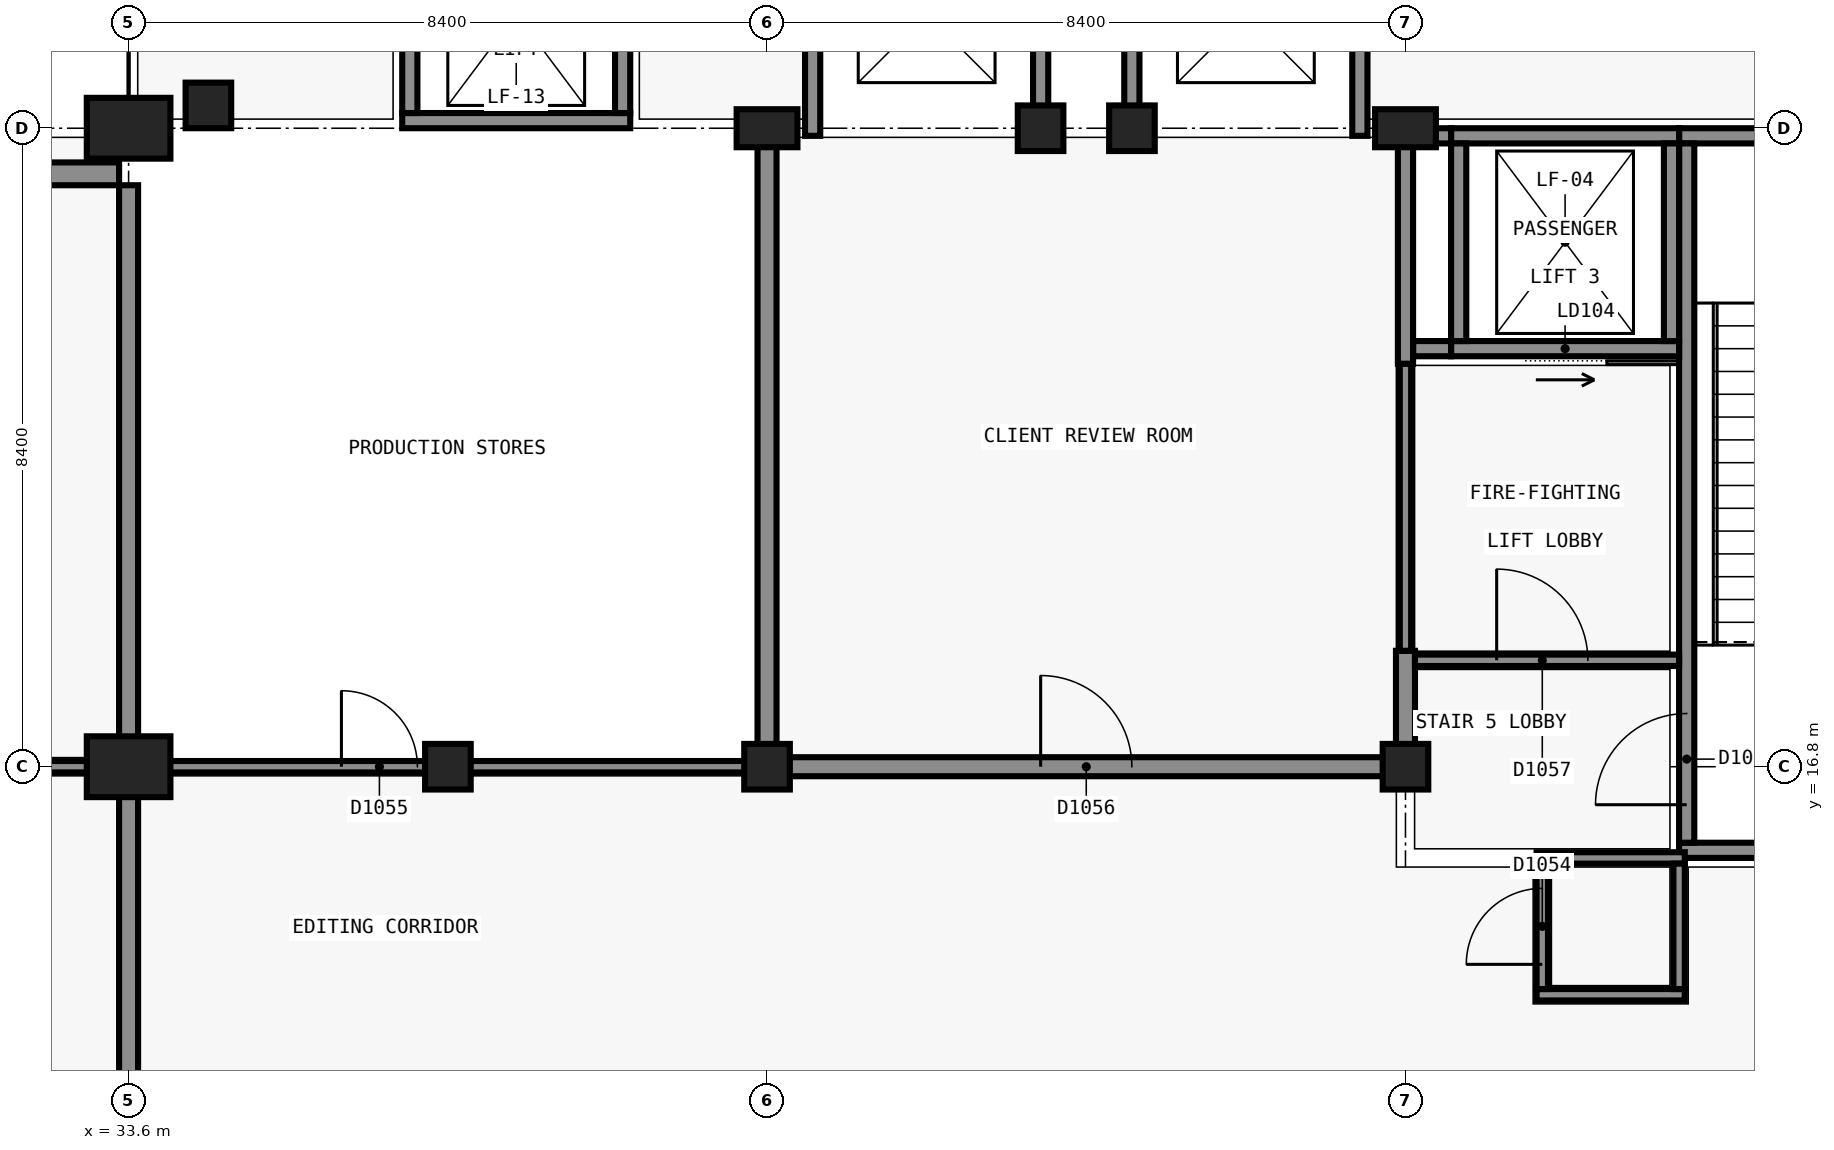
"""IFC4 building model, lengths in metres.
Left out: names, types, materials, properties, quantities, classifications, styles, units other than length and angle.
Written with IfcOpenShell. Run it as: python <this file> out.ifc"""

import sys

from ifc_helpers import new_model, si_unit, direction, frame, frame_2d, origin, origin_2d, place, context, subcontext, project, spatial, rectangle, extrude, element, fill, save


model = new_model("IFC4")
c1 = context("Model", 3, precision=1e-05, world=origin(), true_north=direction((0.0, 1.0)))
c2 = subcontext(c1, "Body", "Model", "MODEL_VIEW")
j1 = project(units=[si_unit("LENGTHUNIT", "METRE"), si_unit("PLANEANGLEUNIT", "RADIAN")], contexts=[c1])
p1 = place(None, origin())
s1 = spatial("IfcSite", under=j1, at=p1, CompositionType="ELEMENT")
p2 = place(p1, origin())
s2 = spatial("IfcBuilding", under=s1, at=p2, CompositionType="ELEMENT")
p3 = place(p2, frame((0.0, 0.0, 5.4)))
s3 = spatial("IfcBuildingStorey", under=s2, at=p3, CompositionType="ELEMENT", Elevation=5.4)
p4 = place(p3, frame((58.8, 15.7, 0.0), z_axis=(0.0, 0.0, 1.0), x_axis=(-1.0, 0.0, 0.0)))
e1 = element("IfcWall", 1, at=p4, inside=s3, PredefinedType="SHEAR", context=c2, shape_type="SweptSolid", body=[
    extrude(rectangle(XDim=4.8, YDim=0.2, at=frame_2d((2.4, 0.0))), origin(), (0.0, 0.0, 1.0), 4.8),
])
p5 = place(p4, frame((1.8, 0.0, 0.0)))
e2 = element("IfcOpeningElement", 2, at=p5, cuts=e1, PredefinedType="OPENING", context=c2, shape_type="SweptSolid", body=[
    extrude(rectangle(XDim=1.2, YDim=2.1, at=frame_2d((0.6, 1.05))), frame((0.0, 0.11, 0.0), z_axis=(0.0, -1.0, 0.0), x_axis=(1.0, 0.0, 0.0)), (0.0, 0.0, 1.0), 0.22),
])
p6 = place(p3, frame((54.0, 25.1, 0.0), z_axis=(0.0, 0.0, 1.0), x_axis=(1.0, 0.0, 0.0)))
e3 = element("IfcWall", 3, at=p6, inside=s3, PredefinedType="SHEAR", context=c2, shape_type="SweptSolid", body=[
    extrude(rectangle(XDim=4.8, YDim=0.2, at=frame_2d((2.4, 0.0))), origin(), (0.0, 0.0, 1.0), 4.8),
])
p7 = place(p3, frame((54.1, 15.8, 0.0), z_axis=(0.0, 0.0, 1.0), x_axis=(0.0, 1.0, 0.0)))
e4 = element("IfcWall", 4, at=p7, inside=s3, PredefinedType="SHEAR", context=c2, shape_type="SweptSolid", body=[
    extrude(rectangle(XDim=9.2, YDim=0.2, at=frame_2d((4.6, 0.0))), origin(), (0.0, 0.0, 1.0), 4.8),
])
p8 = place(p7, frame((0.5, 0.0, 0.0)))
e5 = element("IfcOpeningElement", 5, at=p8, cuts=e4, PredefinedType="OPENING", context=c2, shape_type="SweptSolid", body=[
    extrude(rectangle(XDim=1.2, YDim=2.1, at=frame_2d((0.6, 1.05))), frame((0.0, 0.11, 0.0), z_axis=(0.0, -1.0, 0.0), x_axis=(1.0, 0.0, 0.0)), (0.0, 0.0, 1.0), 0.22),
])
p9 = place(p3, frame((54.0, 22.3, 0.0), z_axis=(0.0, 0.0, 1.0), x_axis=(-1.0, 0.0, 0.0)))
e6 = element("IfcWall", 6, at=p9, inside=s3, PredefinedType="SHEAR", context=c2, shape_type="SweptSolid", body=[
    extrude(rectangle(XDim=3.0, YDim=0.2, at=frame_2d((1.5, 0.0))), origin(), (0.0, 0.0, 1.0), 4.8),
])
p10 = place(p9, frame((0.95, 0.0, 0.0)))
e7 = element("IfcOpeningElement", 7, at=p10, cuts=e6, PredefinedType="OPENING", context=c2, shape_type="SweptSolid", body=[
    extrude(rectangle(XDim=1.1, YDim=2.1, at=frame_2d((0.55, 1.05))), frame((0.0, 0.11, 0.0), z_axis=(0.0, -1.0, 0.0), x_axis=(1.0, 0.0, 0.0)), (0.0, 0.0, 1.0), 0.22),
])
p11 = place(p3, frame((51.0, 25.1, 0.0), z_axis=(0.0, 0.0, 1.0), x_axis=(1.0, 0.0, 0.0)))
e8 = element("IfcWall", 8, at=p11, inside=s3, PredefinedType="SHEAR", context=c2, shape_type="SweptSolid", body=[
    extrude(rectangle(XDim=3.0, YDim=0.2, at=frame_2d((1.5, 0.0))), origin(), (0.0, 0.0, 1.0), 4.8),
])
for number, where, z_axis, x_axis in (
    (9, (51.1, 22.4, 0.0), (0.0, 0.0, 1.0), (0.0, 1.0, 0.0)),
    (10, (53.9, 25.0, 0.0), (0.0, 0.0, 1.0), (0.0, -1.0, 0.0)),
):
    element("IfcWall", number, at=place(p3, frame(where, z_axis=z_axis, x_axis=x_axis)), inside=s3, PredefinedType="SHEAR", context=c2, shape_type="SweptSolid", body=[
        extrude(rectangle(XDim=2.6, YDim=0.2, at=frame_2d((1.3, 0.0))), origin(), (0.0, 0.0, 1.0), 4.8),
    ])
p12 = place(p3, frame((40.2, 25.3, 0.0), z_axis=(0.0, 0.0, 1.0), x_axis=(-1.0, 0.0, 0.0)))
e11 = element("IfcWall", 11, at=p12, inside=s3, PredefinedType="SHEAR", context=c2, shape_type="SweptSolid", body=[
    extrude(rectangle(XDim=3.0, YDim=0.2, at=frame_2d((1.5, 0.0))), origin(), (0.0, 0.0, 1.0), 4.8),
])
for number, where, z_axis, x_axis in (
    (12, (37.3, 25.4, 0.0), (0.0, 0.0, 1.0), (0.0, 1.0, 0.0)),
    (13, (40.1, 28.0, 0.0), (0.0, 0.0, 1.0), (0.0, -1.0, 0.0)),
):
    element("IfcWall", number, at=place(p3, frame(where, z_axis=z_axis, x_axis=x_axis)), inside=s3, PredefinedType="SHEAR", context=c2, shape_type="SweptSolid", body=[
        extrude(rectangle(XDim=2.6, YDim=0.2, at=frame_2d((1.3, 0.0))), origin(), (0.0, 0.0, 1.0), 4.8),
    ])
for number, where, z_axis, x_axis in (
    (14, (33.6, 16.8, 0.0), (0.0, 0.0, 1.0), (0.0, 1.0, 0.0)),
    (15, (33.6, 25.2, 0.0), (0.0, 0.0, 1.0), (1.0, 0.0, 0.0)),
):
    element("IfcColumn", number, at=place(p3, frame(where, z_axis=z_axis, x_axis=x_axis)), inside=s3, PredefinedType="COLUMN", context=c2, shape_type="SweptSolid", body=[
        extrude(rectangle(XDim=1.1, YDim=0.8, at=origin_2d()), origin(), (0.0, 0.0, 1.0), 4.8),
    ])
p13 = place(p3, frame((42.0, 16.8, 0.0), z_axis=(0.0, 0.0, 1.0), x_axis=(1.0, 0.0, 0.0)))
e16 = element("IfcColumn", 16, at=p13, inside=s3, PredefinedType="COLUMN", context=c2, shape_type="SweptSolid", body=[
    extrude(rectangle(XDim=0.6, YDim=0.6, at=origin_2d()), origin(), (0.0, 0.0, 1.0), 4.8),
])
p14 = place(p3, frame((42.0, 25.2, 0.0), z_axis=(0.0, 0.0, 1.0), x_axis=(1.0, 0.0, 0.0)))
e17 = element("IfcColumn", 17, at=p14, inside=s3, PredefinedType="COLUMN", context=c2, shape_type="SweptSolid", body=[
    extrude(rectangle(XDim=0.8, YDim=0.5, at=origin_2d()), origin(), (0.0, 0.0, 1.0), 4.8),
])
p15 = place(p3, frame((50.4, 16.8, 0.0), z_axis=(0.0, 0.0, 1.0), x_axis=(1.0, 0.0, 0.0)))
e18 = element("IfcColumn", 18, at=p15, inside=s3, PredefinedType="COLUMN", context=c2, shape_type="SweptSolid", body=[
    extrude(rectangle(XDim=0.6, YDim=0.6, at=origin_2d()), origin(), (0.0, 0.0, 1.0), 4.8),
])
p16 = place(p3, frame((50.4, 25.2, 0.0), z_axis=(0.0, 0.0, 1.0), x_axis=(1.0, 0.0, 0.0)))
e19 = element("IfcColumn", 19, at=p16, inside=s3, PredefinedType="COLUMN", context=c2, shape_type="SweptSolid", body=[
    extrude(rectangle(XDim=0.8, YDim=0.5, at=origin_2d()), origin(), (0.0, 0.0, 1.0), 4.8),
])
p17 = place(p3, frame((34.65, 25.5, 0.0), z_axis=(0.0, 0.0, 1.0), x_axis=(1.0, 0.0, 0.0)))
e20 = element("IfcColumn", 20, at=p17, inside=s3, PredefinedType="COLUMN", context=c2, shape_type="SweptSolid", body=[
    extrude(rectangle(XDim=0.6, YDim=0.6, at=origin_2d()), origin(), (0.0, 0.0, 1.0), 4.8),
])
p18 = place(p3, frame((51.0, 22.3, 0.0), z_axis=(0.0, 0.0, 1.0), x_axis=(-1.0, 0.0, 0.0)))
e21 = element("IfcWall", 21, at=p18, inside=s3, PredefinedType="SHEAR", context=c2, shape_type="SweptSolid", body=[
    extrude(rectangle(XDim=0.5, YDim=0.2, at=frame_2d((0.25, 0.0))), origin(), (0.0, 0.0, 1.0), 4.8),
])
p19 = place(p3, frame((50.8, 25.1, 0.0), z_axis=(0.0, 0.0, 1.0), x_axis=(1.0, 0.0, 0.0)))
e22 = element("IfcWall", 22, at=p19, inside=s3, PredefinedType="SHEAR", context=c2, shape_type="SweptSolid", body=[
    extrude(rectangle(XDim=0.2, YDim=0.2, at=frame_2d((0.1, 0.0))), origin(), (0.0, 0.0, 1.0), 4.8),
])
for number, where, z_axis, x_axis in (
    (23, (45.599, 25.2, 0.0), (0.0, 0.0, 1.0), (1.0, 0.0, 0.0)),
    (24, (46.801, 25.2, 0.0), (0.0, 0.0, 1.0), (1.0, 0.0, 0.0)),
    (25, (37.801, 16.8, 0.0), (0.0, 0.0, 1.0), (1.0, 0.0, 0.0)),
):
    element("IfcColumn", number, at=place(p3, frame(where, z_axis=z_axis, x_axis=x_axis)), inside=s3, PredefinedType="COLUMN", context=c2, shape_type="SweptSolid", body=[
        extrude(rectangle(XDim=0.6, YDim=0.6, at=origin_2d()), origin(), (0.0, 0.0, 1.0), 4.8),
    ])
p20 = place(p3, frame((29.051, 24.6, 0.0), z_axis=(0.0, 0.0, 1.0), x_axis=(1.0, 0.0, 0.0)))
e26 = element("IfcWall", 26, at=p20, inside=s3, PredefinedType="SOLIDWALL", context=c2, shape_type="SweptSolid", body=[
    extrude(rectangle(XDim=4.425, YDim=0.3, at=frame_2d((2.212, 0.0))), origin(), (0.0, 0.0, 1.0), 4.5),
])
p21 = place(p20, frame((0.775, 0.0, 0.9)))
e27 = element("IfcOpeningElement", 27, at=p21, cuts=e26, PredefinedType="OPENING", context=c2, shape_type="SweptSolid", body=[
    extrude(rectangle(XDim=2.4, YDim=1.5, at=frame_2d((1.2, 0.75))), frame((0.0, 0.16, 0.0), z_axis=(0.0, -1.0, 0.0), x_axis=(1.0, 0.0, 0.0)), (0.0, 0.0, 1.0), 0.32),
])
p22 = place(p3, frame((41.875, 16.8, 0.0), z_axis=(0.0, 0.0, 1.0), x_axis=(1.0, 0.0, 0.0)))
e28 = element("IfcWall", 28, at=p22, inside=s3, PredefinedType="PARTITIONING", context=c2, shape_type="SweptSolid", body=[
    extrude(rectangle(XDim=8.65, YDim=0.25, at=frame_2d((4.325, 0.0))), origin(), (0.0, 0.0, 1.0), 3.8),
])
p23 = place(p22, frame((3.725, 0.0, 0.0)))
e29 = element("IfcOpeningElement", 29, at=p23, cuts=e28, PredefinedType="OPENING", context=c2, shape_type="SweptSolid", body=[
    extrude(rectangle(XDim=1.2, YDim=2.1, at=frame_2d((0.6, 1.05))), frame((0.0, 0.135, 0.0), z_axis=(0.0, -1.0, 0.0), x_axis=(1.0, 0.0, 0.0)), (0.0, 0.0, 1.0), 0.27),
])
p24 = place(p3, frame((33.6, 8.6, 0.0), z_axis=(0.0, 0.0, 1.0), x_axis=(0.0, 1.0, 0.0)))
e30 = element("IfcWall", 30, at=p24, inside=s3, PredefinedType="SOLIDWALL", context=c2, shape_type="SweptSolid", body=[
    extrude(rectangle(XDim=15.85, YDim=0.25, at=frame_2d((7.925, 0.0))), origin(), (0.0, 0.0, 1.0), 3.8),
])
p25 = place(p3, frame((42.0, 16.925, 0.0), z_axis=(0.0, 0.0, 1.0), x_axis=(0.0, 1.0, 0.0)))
e31 = element("IfcWall", 31, at=p25, inside=s3, PredefinedType="PARTITIONING", context=c2, shape_type="SweptSolid", body=[
    extrude(rectangle(XDim=8.4, YDim=0.25, at=frame_2d((4.2, 0.0))), origin(), (0.0, 0.0, 1.0), 3.8),
])
p26 = place(p3, frame((50.4, 16.925, 0.0), z_axis=(0.0, 0.0, 1.0), x_axis=(0.0, 1.0, 0.0)))
e32 = element("IfcWall", 32, at=p26, inside=s3, PredefinedType="PARTITIONING", context=c2, shape_type="SweptSolid", body=[
    extrude(rectangle(XDim=1.4, YDim=0.25, at=frame_2d((0.7, 0.0))), origin(), (0.0, 0.0, 1.0), 3.8),
])
for number, where, z_axis, x_axis in (
    (33, (42.6, 25.1, 0.0), (0.0, 0.0, 1.0), (0.0, 1.0, 0.0)),
    (34, (45.6, 25.1, 0.0), (0.0, 0.0, 1.0), (0.0, 1.0, 0.0)),
    (35, (46.8, 25.1, 0.0), (0.0, 0.0, 1.0), (0.0, 1.0, 0.0)),
    (36, (49.8, 25.1, 0.0), (0.0, 0.0, 1.0), (0.0, 1.0, 0.0)),
):
    element("IfcWall", number, at=place(p3, frame(where, z_axis=z_axis, x_axis=x_axis)), inside=s3, PredefinedType="SHEAR", context=c2, shape_type="SweptSolid", body=[
        extrude(rectangle(XDim=3.0, YDim=0.2, at=frame_2d((1.5, 0.0))), origin(), (0.0, 0.0, 1.0), 4.5),
    ])
p27 = place(p3, frame((50.4, 22.1, 0.0), z_axis=(0.0, 0.0, 1.0), x_axis=(0.0, 1.0, 0.0)))
e37 = element("IfcWall", 37, at=p27, inside=s3, PredefinedType="SHEAR", context=c2, shape_type="SweptSolid", body=[
    extrude(rectangle(XDim=3.2, YDim=0.2, at=frame_2d((1.6, 0.0))), origin(), (0.0, 0.0, 1.0), 4.5),
])
for number, where, z_axis, x_axis in (
    (38, (52.125, 13.8, 0.0), (0.0, 0.0, 1.0), (1.0, 0.0, 0.0)),
    (39, (52.125, 15.6, 0.0), (0.0, 0.0, 1.0), (1.0, 0.0, 0.0)),
):
    element("IfcWall", number, at=place(p3, frame(where, z_axis=z_axis, x_axis=x_axis)), inside=s3, PredefinedType="PARTITIONING", context=c2, shape_type="SweptSolid", body=[
        extrude(rectangle(XDim=1.95, YDim=0.15, at=frame_2d((0.975, 0.0))), origin(), (0.0, 0.0, 1.0), 4.5),
    ])
p28 = place(p3, frame((8.325, 16.8, 0.0), z_axis=(0.0, 0.0, 1.0), x_axis=(1.0, 0.0, 0.0)))
e40 = element("IfcWall", 40, at=p28, inside=s3, PredefinedType="PARTITIONING", context=c2, shape_type="SweptSolid", body=[
    extrude(rectangle(XDim=25.15, YDim=0.15, at=frame_2d((12.575, 0.0))), origin(), (0.0, 0.0, 1.0), 3.8),
])
p29 = place(p28, frame((20.575, 0.0, 0.0)))
e41 = element("IfcOpeningElement", 41, at=p29, cuts=e40, PredefinedType="OPENING", context=c2, shape_type="SweptSolid", body=[
    extrude(rectangle(XDim=1.0, YDim=2.1, at=frame_2d((0.5, 1.05))), frame((0.0, 0.085, 0.0), z_axis=(0.0, -1.0, 0.0), x_axis=(1.0, 0.0, 0.0)), (0.0, 0.0, 1.0), 0.17),
])
p30 = place(p28, frame((5.875, 0.0, 0.0)))
e42 = element("IfcOpeningElement", 42, at=p30, cuts=e40, PredefinedType="OPENING", context=c2, shape_type="SweptSolid", body=[
    extrude(rectangle(XDim=1.0, YDim=2.1, at=frame_2d((0.5, 1.05))), frame((0.0, 0.085, 0.0), z_axis=(0.0, -1.0, 0.0), x_axis=(1.0, 0.0, 0.0)), (0.0, 0.0, 1.0), 0.17),
])
p31 = place(p28, frame((12.175, 0.0, 0.0)))
e43 = element("IfcOpeningElement", 43, at=p31, cuts=e40, PredefinedType="OPENING", context=c2, shape_type="SweptSolid", body=[
    extrude(rectangle(XDim=1.0, YDim=2.1, at=frame_2d((0.5, 1.05))), frame((0.0, 0.085, 0.0), z_axis=(0.0, -1.0, 0.0), x_axis=(1.0, 0.0, 0.0)), (0.0, 0.0, 1.0), 0.17),
])
p32 = place(p3, frame((33.725, 16.8, 0.0), z_axis=(0.0, 0.0, 1.0), x_axis=(1.0, 0.0, 0.0)))
e44 = element("IfcWall", 44, at=p32, inside=s3, PredefinedType="PARTITIONING", context=c2, shape_type="SweptSolid", body=[
    extrude(rectangle(XDim=8.15, YDim=0.15, at=frame_2d((4.075, 0.0))), origin(), (0.0, 0.0, 1.0), 3.8),
])
p33 = place(p32, frame((2.675, 0.0, 0.0)))
e45 = element("IfcOpeningElement", 45, at=p33, cuts=e44, PredefinedType="OPENING", context=c2, shape_type="SweptSolid", body=[
    extrude(rectangle(XDim=1.0, YDim=2.1, at=frame_2d((0.5, 1.05))), frame((0.0, 0.085, 0.0), z_axis=(0.0, -1.0, 0.0), x_axis=(1.0, 0.0, 0.0)), (0.0, 0.0, 1.0), 0.17),
])
p34 = place(p3, frame((50.525, 18.2, 0.0), z_axis=(0.0, 0.0, 1.0), x_axis=(1.0, 0.0, 0.0)))
e46 = element("IfcWall", 46, at=p34, inside=s3, PredefinedType="SOLIDWALL", context=c2, shape_type="SweptSolid", body=[
    extrude(rectangle(XDim=3.475, YDim=0.15, at=frame_2d((1.738, 0.0))), origin(), (0.0, 0.0, 1.0), 3.8),
])
p35 = place(p34, frame((1.075, 0.0, 0.0)))
e47 = element("IfcOpeningElement", 47, at=p35, cuts=e46, PredefinedType="OPENING", context=c2, shape_type="SweptSolid", body=[
    extrude(rectangle(XDim=1.2, YDim=2.1, at=frame_2d((0.6, 1.05))), frame((0.0, 0.085, 0.0), z_axis=(0.0, -1.0, 0.0), x_axis=(1.0, 0.0, 0.0)), (0.0, 0.0, 1.0), 0.17),
])
p36 = place(p3, frame((52.2, 13.875, 0.0), z_axis=(0.0, 0.0, 1.0), x_axis=(0.0, 1.0, 0.0)))
e48 = element("IfcWall", 48, at=p36, inside=s3, PredefinedType="PARTITIONING", context=c2, shape_type="SweptSolid", body=[
    extrude(rectangle(XDim=1.65, YDim=0.15, at=frame_2d((0.825, 0.0))), origin(), (0.0, 0.0, 1.0), 4.5),
])
p37 = place(p36, frame((0.325, 0.0, 0.0)))
e49 = element("IfcOpeningElement", 49, at=p37, cuts=e48, PredefinedType="OPENING", context=c2, shape_type="SweptSolid", body=[
    extrude(rectangle(XDim=1.0, YDim=2.1, at=frame_2d((0.5, 1.05))), frame((0.0, 0.085, 0.0), z_axis=(0.0, -1.0, 0.0), x_axis=(1.0, 0.0, 0.0)), (0.0, 0.0, 1.0), 0.17),
])
p38 = place(p3, frame((54.0, 13.875, 0.0), z_axis=(0.0, 0.0, 1.0), x_axis=(0.0, 1.0, 0.0)))
e50 = element("IfcWall", 50, at=p38, inside=s3, PredefinedType="PARTITIONING", context=c2, shape_type="SweptSolid", body=[
    extrude(rectangle(XDim=1.65, YDim=0.15, at=frame_2d((0.825, 0.0))), origin(), (0.0, 0.0, 1.0), 4.5),
])
p39 = place(p3, frame((50.4, 18.325, 0.0), z_axis=(0.0, 0.0, 1.0), x_axis=(0.0, 1.0, 0.0)))
e51 = element("IfcWall", 51, at=p39, inside=s3, PredefinedType="SOLIDWALL", context=c2, shape_type="SweptSolid", body=[
    extrude(rectangle(XDim=3.775, YDim=0.15, at=frame_2d((1.888, 0.0))), origin(), (0.0, 0.0, 1.0), 3.8),
])
p40 = place(p10, origin())
e52 = element("IfcDoor", 52, at=p40, inside=s3, OperationType="SLIDING_TO_LEFT", PredefinedType="DOOR", context=c2, shape_type="SweptSolid", body=[
    extrude(rectangle(XDim=1.1, YDim=2.1, at=frame_2d((0.55, 1.05))), frame((0.0, 0.025, 0.0), z_axis=(0.0, -1.0, 0.0), x_axis=(1.0, 0.0, 0.0)), (0.0, 0.0, 1.0), 0.05),
])
fill(e7, e52)
p41 = place(p8, origin())
e53 = element("IfcDoor", 53, at=p41, inside=s3, OperationType="SINGLE_SWING_LEFT", PredefinedType="DOOR", context=c2, shape_type="SweptSolid", body=[
    extrude(rectangle(XDim=1.2, YDim=2.1, at=frame_2d((0.6, 1.05))), frame((0.0, 0.025, 0.0), z_axis=(0.0, -1.0, 0.0), x_axis=(1.0, 0.0, 0.0)), (0.0, 0.0, 1.0), 0.05),
])
fill(e5, e53)
p42 = place(p37, origin())
e54 = element("IfcDoor", 54, at=p42, inside=s3, OperationType="SINGLE_SWING_LEFT", PredefinedType="DOOR", context=c2, shape_type="SweptSolid", body=[
    extrude(rectangle(XDim=1.0, YDim=2.1, at=frame_2d((0.5, 1.05))), frame((0.0, 0.025, 0.0), z_axis=(0.0, -1.0, 0.0), x_axis=(1.0, 0.0, 0.0)), (0.0, 0.0, 1.0), 0.05),
])
fill(e49, e54)
p43 = place(p33, origin())
e55 = element("IfcDoor", 55, at=p43, inside=s3, OperationType="SINGLE_SWING_LEFT", PredefinedType="DOOR", context=c2, shape_type="SweptSolid", body=[
    extrude(rectangle(XDim=1.0, YDim=2.1, at=frame_2d((0.5, 1.05))), frame((0.0, 0.025, 0.0), z_axis=(0.0, -1.0, 0.0), x_axis=(1.0, 0.0, 0.0)), (0.0, 0.0, 1.0), 0.05),
])
fill(e45, e55)
p44 = place(p23, origin())
e56 = element("IfcDoor", 56, at=p44, inside=s3, OperationType="SINGLE_SWING_RIGHT", PredefinedType="DOOR", context=c2, shape_type="SweptSolid", body=[
    extrude(rectangle(XDim=1.2, YDim=2.1, at=frame_2d((0.6, 1.05))), frame((0.0, 0.025, 0.0), z_axis=(0.0, -1.0, 0.0), x_axis=(1.0, 0.0, 0.0)), (0.0, 0.0, 1.0), 0.05),
])
fill(e29, e56)
p45 = place(p35, origin())
e57 = element("IfcDoor", 57, at=p45, inside=s3, OperationType="SINGLE_SWING_RIGHT", PredefinedType="DOOR", context=c2, shape_type="SweptSolid", body=[
    extrude(rectangle(XDim=1.2, YDim=2.1, at=frame_2d((0.6, 1.05))), frame((0.0, 0.025, 0.0), z_axis=(0.0, -1.0, 0.0), x_axis=(1.0, 0.0, 0.0)), (0.0, 0.0, 1.0), 0.05),
])
fill(e47, e57)
save(model, sys.argv[1])
